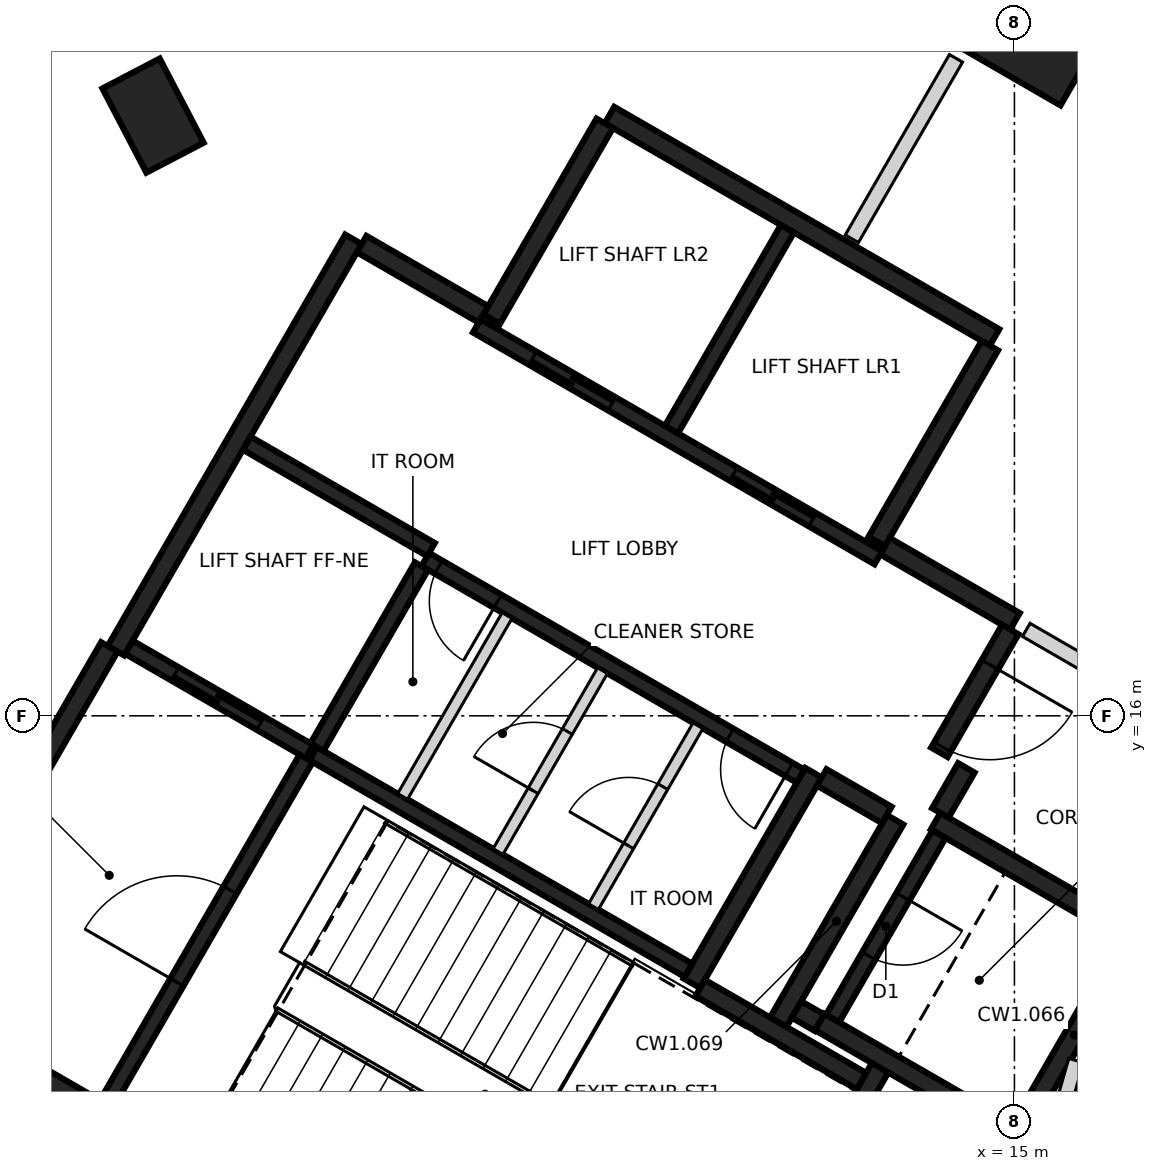
"""IFC4 building model, lengths in metres.
Left out: names, types, materials, properties, quantities, classifications, styles, units other than length and angle.
Written with IfcOpenShell. Run it as: python <this file> out.ifc"""

import sys

from ifc_helpers import new_model, si_unit, direction, frame, frame_2d, origin, origin_2d, place, context, subcontext, project, spatial, rectangle, extrude, element, fill, save


model = new_model("IFC4")
c1 = context("Model", 3, precision=1e-05, world=origin(), true_north=direction((0.0, 1.0)))
c2 = subcontext(c1, "Body", "Model", "MODEL_VIEW")
j1 = project(units=[si_unit("LENGTHUNIT", "METRE"), si_unit("PLANEANGLEUNIT", "RADIAN")], contexts=[c1])
p1 = place(None, origin())
s1 = spatial("IfcSite", under=j1, at=p1, CompositionType="ELEMENT")
p2 = place(p1, origin())
s2 = spatial("IfcBuilding", under=s1, at=p2, CompositionType="ELEMENT")
p3 = place(p2, frame((0.0, 0.0, 154.0)))
s3 = spatial("IfcBuildingStorey", under=s2, at=p3, CompositionType="ELEMENT", Elevation=154.0)
p4 = place(p3, frame((3.667, 23.896, -0.4), z_axis=(0.0, 0.0, 1.0), x_axis=(-0.463006774365, 0.886354740999, 0.0)))
e1 = element("IfcColumn", 1, at=p4, inside=s3, PredefinedType="COLUMN", context=c2, shape_type="SweptSolid", body=[
    extrude(rectangle(XDim=1.25, YDim=0.85, at=origin_2d()), origin(), (0.0, 0.0, 1.0), 3.6),
])
p5 = place(p3, frame((15.207, 26.34, -0.4), z_axis=(0.0, 0.0, 1.0), x_axis=(0.5, 0.866025403784, 0.0)))
e2 = element("IfcColumn", 2, at=p5, inside=s3, PredefinedType="COLUMN", context=c2, shape_type="SweptSolid", body=[
    extrude(rectangle(XDim=3.6, YDim=3.0, at=origin_2d()), origin(), (0.0, 0.0, 1.0), 3.6),
])
p6 = place(p3, frame((10.42, 6.498, 0.0), z_axis=(0.0, 0.0, 1.0), x_axis=(-0.866021906294, 0.500006057782, 0.0)))
e3 = element("IfcWall", 3, at=p6, inside=s3, PredefinedType="SHEAR", context=c2, shape_type="SweptSolid", body=[
    extrude(rectangle(XDim=11.55, YDim=0.25, at=frame_2d((5.775, 0.0))), origin(), (0.0, 0.0, 1.0), 3.2),
])
p7 = place(p6, frame((10.025, 0.0, 0.0)))
e4 = element("IfcOpeningElement", 4, at=p7, cuts=e3, PredefinedType="OPENING", context=c2, shape_type="SweptSolid", body=[
    extrude(rectangle(XDim=1.2, YDim=2.1, at=frame_2d((0.6, 1.05))), frame((0.0, 0.135, 0.0), z_axis=(0.0, -1.0, 0.0), x_axis=(1.0, 0.0, 0.0)), (0.0, 0.0, 1.0), 0.27),
])
p8 = place(p6, frame((8.725, 0.0, 0.0)))
e5 = element("IfcOpeningElement", 5, at=p8, cuts=e3, PredefinedType="OPENING", context=c2, shape_type="SweptSolid", body=[
    extrude(rectangle(XDim=1.2, YDim=2.1, at=frame_2d((0.6, 1.05))), frame((0.0, 0.135, 0.0), z_axis=(0.0, -1.0, 0.0), x_axis=(1.0, 0.0, 0.0)), (0.0, 0.0, 1.0), 0.27),
])
p9 = place(p3, frame((3.179, 16.856, 0.0), z_axis=(0.0, 0.0, 1.0), x_axis=(0.500004234368, 0.866022959057, 0.0)))
e6 = element("IfcWall", 6, at=p9, inside=s3, PredefinedType="SHEAR", context=c2, shape_type="SweptSolid", body=[
    extrude(rectangle(XDim=6.25, YDim=0.25, at=frame_2d((3.125, 0.0))), origin(), (0.0, 0.0, 1.0), 3.2),
])
p10 = place(p3, frame((9.673, 23.903, 0.0), z_axis=(0.0, 0.0, 1.0), x_axis=(0.86603616409, -0.499981362141, 0.0)))
e7 = element("IfcWall", 7, at=p10, inside=s3, PredefinedType="SHEAR", context=c2, shape_type="SweptSolid", body=[
    extrude(rectangle(XDim=5.85, YDim=0.25, at=frame_2d((2.925, 0.0))), origin(), (0.0, 0.0, 1.0), 3.2),
])
p11 = place(p3, frame((0.48, 12.381, 0.0), z_axis=(0.0, 0.0, 1.0), x_axis=(0.49999885962, 0.866026062182, 0.0)))
e8 = element("IfcWall", 8, at=p11, inside=s3, PredefinedType="SHEAR", context=c2, shape_type="SweptSolid", body=[
    extrude(rectangle(XDim=5.225, YDim=0.25, at=frame_2d((2.612, 0.0))), origin(), (0.0, 0.0, 1.0), 3.2),
])
p12 = place(p3, frame((13.238, 11.378, 0.0), z_axis=(0.0, 0.0, 1.0), x_axis=(-0.500008851346, -0.866020293397, 0.0)))
e9 = element("IfcWall", 9, at=p12, inside=s3, PredefinedType="SHEAR", context=c2, shape_type="SweptSolid", body=[
    extrude(rectangle(XDim=5.51, YDim=0.25, at=frame_2d((2.755, 0.0))), origin(), (0.0, 0.0, 1.0), 3.2),
])
p13 = place(p3, frame((12.357, 15.252, 0.0), z_axis=(0.0, 0.0, 1.0), x_axis=(-0.500028443584, -0.866008981251, 0.0)))
e10 = element("IfcWall", 10, at=p13, inside=s3, PredefinedType="SHEAR", context=c2, shape_type="SweptSolid", body=[
    extrude(rectangle(XDim=3.2, YDim=0.25, at=frame_2d((1.6, 0.0))), origin(), (0.0, 0.0, 1.0), 3.2),
])
for number, where, z_axis, x_axis in (
    (11, (8.123, 21.219, 0.0), (0.0, 0.0, 1.0), (0.5, 0.866, 0.0)),
    (12, (14.676, 20.87, 0.0), (0.0, 0.0, 1.0), (-0.5, -0.866, 0.0)),
):
    element("IfcWall", number, at=place(p3, frame(where, z_axis=z_axis, x_axis=x_axis)), inside=s3, PredefinedType="SHEAR", context=c2, shape_type="SweptSolid", body=[
        extrude(rectangle(XDim=2.975, YDim=0.25, at=frame_2d((1.487, 0.0))), origin(), (0.0, 0.0, 1.0), 3.2),
    ])
p14 = place(p3, frame((16.552, 13.119, 0.0), z_axis=(0.0, 0.0, 1.0), x_axis=(-0.499978833458, -0.866037623948, 0.0)))
e13 = element("IfcWall", 13, at=p14, inside=s3, PredefinedType="SHEAR", context=c2, shape_type="SweptSolid", body=[
    extrude(rectangle(XDim=3.05, YDim=0.25, at=frame_2d((1.525, 0.0))), origin(), (0.0, 0.0, 1.0), 3.2),
])
p15 = place(p3, frame((14.918, 10.54, 0.0), z_axis=(0.0, 0.0, 1.0), x_axis=(-0.866063538972, 0.499933942099, 0.0)))
e14 = element("IfcWall", 14, at=p15, inside=s3, PredefinedType="SHEAR", context=c2, shape_type="SweptSolid", body=[
    extrude(rectangle(XDim=2.865, YDim=0.25, at=frame_2d((1.432, 0.0))), origin(), (0.0, 0.0, 1.0), 3.2),
])
p16 = place(p3, frame((13.963, 14.614, 0.0), z_axis=(0.0, 0.0, 1.0), x_axis=(0.866042235819, -0.499970844928, 0.0)))
e15 = element("IfcWall", 15, at=p16, inside=s3, PredefinedType="SHEAR", context=c2, shape_type="SweptSolid", body=[
    extrude(rectangle(XDim=2.865, YDim=0.25, at=frame_2d((1.432, 0.0))), origin(), (0.0, 0.0, 1.0), 3.2),
])
p17 = place(p3, frame((11.888, 11.961, 0.0), z_axis=(0.0, 0.0, 1.0), x_axis=(0.500003324108, 0.866023484601, 0.0)))
e16 = element("IfcWall", 16, at=p17, inside=s3, PredefinedType="SHEAR", context=c2, shape_type="SweptSolid", body=[
    extrude(rectangle(XDim=3.085, YDim=0.25, at=frame_2d((1.542, 0.0))), origin(), (0.0, 0.0, 1.0), 3.2),
])
p18 = place(p3, frame((10.865, 12.418, 0.0), z_axis=(0.0, 0.0, 1.0), x_axis=(0.866026229868, -0.499998569178, 0.0)))
e17 = element("IfcWall", 17, at=p18, inside=s3, PredefinedType="SHEAR", context=c2, shape_type="SweptSolid", body=[
    extrude(rectangle(XDim=2.449, YDim=0.25, at=frame_2d((1.225, 0.0))), origin(), (0.0, 0.0, 1.0), 3.2),
])
p19 = place(p3, frame((13.297, 18.231, 0.0), z_axis=(0.0, 0.0, 1.0), x_axis=(0.866043531843, -0.499968599967, 0.0)))
e18 = element("IfcWall", 18, at=p19, inside=s3, PredefinedType="SHEAR", context=c2, shape_type="SweptSolid", body=[
    extrude(rectangle(XDim=1.975, YDim=0.25, at=frame_2d((0.987, 0.0))), origin(), (0.0, 0.0, 1.0), 3.2),
])
p20 = place(p3, frame((6.413, 22.206, 0.0), z_axis=(0.0, 0.0, 1.0), x_axis=(0.866016279763, -0.500015802937, 0.0)))
e19 = element("IfcWall", 19, at=p20, inside=s3, PredefinedType="SHEAR", context=c2, shape_type="SweptSolid", body=[
    extrude(rectangle(XDim=1.849, YDim=0.25, at=frame_2d((0.925, 0.0))), origin(), (0.0, 0.0, 1.0), 3.2),
])
p21 = place(p3, frame((14.945, 17.135, 0.0), z_axis=(0.0, 0.0, 1.0), x_axis=(-0.499983108224, -0.866035156036, 0.0)))
e20 = element("IfcWall", 20, at=p21, inside=s3, PredefinedType="SHEAR", context=c2, shape_type="SweptSolid", body=[
    extrude(rectangle(XDim=1.865, YDim=0.25, at=frame_2d((0.932, 0.0))), origin(), (0.0, 0.0, 1.0), 3.2),
])
p22 = place(p21, frame((0.535, 0.0, 0.0)))
e21 = element("IfcOpeningElement", 21, at=p22, cuts=e20, PredefinedType="OPENING", context=c2, shape_type="SweptSolid", body=[
    extrude(rectangle(XDim=1.25, YDim=2.1, at=frame_2d((0.625, 1.05))), frame((0.0, 0.135, 0.0), z_axis=(0.0, -1.0, 0.0), x_axis=(1.0, 0.0, 0.0)), (0.0, 0.0, 1.0), 0.27),
])
p23 = place(p3, frame((13.322, 14.695, 0.0), z_axis=(0.0, 0.0, 1.0), x_axis=(-0.866017078145, 0.500014420154, 0.0)))
e22 = element("IfcWall", 22, at=p23, inside=s3, PredefinedType="SHEAR", context=c2, shape_type="SweptSolid", body=[
    extrude(rectangle(XDim=0.989, YDim=0.25, at=frame_2d((0.495, 0.0))), origin(), (0.0, 0.0, 1.0), 3.2),
])
p24 = place(p3, frame((14.368, 15.315, 0.0), z_axis=(0.0, 0.0, 1.0), x_axis=(-0.499897359611, -0.866084655132, 0.0)))
e23 = element("IfcWall", 23, at=p24, inside=s3, PredefinedType="SHEAR", context=c2, shape_type="SweptSolid", body=[
    extrude(rectangle(XDim=0.685, YDim=0.25, at=frame_2d((0.342, 0.0))), origin(), (0.0, 0.0, 1.0), 3.2),
])
p25 = place(p3, frame((12.433, 11.964, 0.0), z_axis=(0.0, 0.0, 1.0), x_axis=(-0.866055875208, 0.499947218231, 0.0)))
e24 = element("IfcWall", 24, at=p25, inside=s3, PredefinedType="SHEAR", context=c2, shape_type="SweptSolid", body=[
    extrude(rectangle(XDim=0.345, YDim=0.25, at=frame_2d((0.172, 0.0))), origin(), (0.0, 0.0, 1.0), 3.2),
])
p26 = place(p3, frame((13.21, 18.08, 0.0), z_axis=(0.0, 0.0, 1.0), x_axis=(-0.866030299012, 0.499991521122, 0.0)))
e25 = element("IfcWall", 25, at=p26, inside=s3, PredefinedType="SHEAR", context=c2, shape_type="SweptSolid", body=[
    extrude(rectangle(XDim=6.1, YDim=0.2, at=frame_2d((3.05, 0.0))), origin(), (0.0, 0.0, 1.0), 3.2),
])
p27 = place(p26, frame((1.0, 0.0, 0.0)))
e26 = element("IfcOpeningElement", 26, at=p27, cuts=e25, PredefinedType="OPENING", context=c2, shape_type="SweptSolid", body=[
    extrude(rectangle(XDim=1.2, YDim=2.1, at=frame_2d((0.6, 1.05))), frame((0.0, 0.11, 0.0), z_axis=(0.0, -1.0, 0.0), x_axis=(1.0, 0.0, 0.0)), (0.0, 0.0, 1.0), 0.22),
])
p28 = place(p26, frame((4.05, 0.0, 0.0)))
e27 = element("IfcOpeningElement", 27, at=p28, cuts=e25, PredefinedType="OPENING", context=c2, shape_type="SweptSolid", body=[
    extrude(rectangle(XDim=1.2, YDim=2.1, at=frame_2d((0.6, 1.05))), frame((0.0, 0.11, 0.0), z_axis=(0.0, -1.0, 0.0), x_axis=(1.0, 0.0, 0.0)), (0.0, 0.0, 1.0), 0.22),
])
p29 = place(p3, frame((5.775, 15.502, 0.0), z_axis=(0.0, 0.0, 1.0), x_axis=(0.866020080793, -0.500009219579, 0.0)))
e28 = element("IfcWall", 28, at=p29, inside=s3, PredefinedType="SHEAR", context=c2, shape_type="SweptSolid", body=[
    extrude(rectangle(XDim=5.699, YDim=0.2, at=frame_2d((2.85, 0.0))), origin(), (0.0, 0.0, 1.0), 3.2),
])
p30 = place(p3, frame((12.185, 15.207, 0.0), z_axis=(0.0, 0.0, 1.0), x_axis=(-0.866020080793, 0.500009219579, 0.0)))
e29 = element("IfcWall", 29, at=p30, inside=s3, PredefinedType="SHEAR", context=c2, shape_type="SweptSolid", body=[
    extrude(rectangle(XDim=5.699, YDim=0.2, at=frame_2d((2.85, 0.0))), origin(), (0.0, 0.0, 1.0), 3.2),
])
p31 = place(p30, frame((0.174, 0.0, 0.0)))
e30 = element("IfcOpeningElement", 30, at=p31, cuts=e29, PredefinedType="OPENING", context=c2, shape_type="SweptSolid", body=[
    extrude(rectangle(XDim=0.9, YDim=2.1, at=frame_2d((0.45, 1.05))), frame((0.0, 0.11, 0.0), z_axis=(0.0, -1.0, 0.0), x_axis=(1.0, 0.0, 0.0)), (0.0, 0.0, 1.0), 0.22),
])
p32 = place(p30, frame((4.599, 0.0, 0.0)))
e31 = element("IfcOpeningElement", 31, at=p32, cuts=e29, PredefinedType="OPENING", context=c2, shape_type="SweptSolid", body=[
    extrude(rectangle(XDim=0.9, YDim=2.1, at=frame_2d((0.45, 1.05))), frame((0.0, 0.11, 0.0), z_axis=(0.0, -1.0, 0.0), x_axis=(1.0, 0.0, 0.0)), (0.0, 0.0, 1.0), 0.22),
])
p33 = place(p3, frame((3.057, 10.895, 0.0), z_axis=(0.0, 0.0, 1.0), x_axis=(0.499989418164, 0.866031513124, 0.0)))
e32 = element("IfcWall", 32, at=p33, inside=s3, PredefinedType="SHEAR", context=c2, shape_type="SweptSolid", body=[
    extrude(rectangle(XDim=5.251, YDim=0.2, at=frame_2d((2.625, 0.0))), origin(), (0.0, 0.0, 1.0), 3.2),
])
p34 = place(p33, frame((1.849, 0.0, 0.0)))
e33 = element("IfcOpeningElement", 33, at=p34, cuts=e32, PredefinedType="OPENING", context=c2, shape_type="SweptSolid", body=[
    extrude(rectangle(XDim=1.4, YDim=2.1, at=frame_2d((0.7, 1.05))), frame((0.0, 0.11, 0.0), z_axis=(0.0, -1.0, 0.0), x_axis=(1.0, 0.0, 0.0)), (0.0, 0.0, 1.0), 0.22),
])
p35 = place(p3, frame((10.489, 19.767, 0.0), z_axis=(0.0, 0.0, 1.0), x_axis=(0.499946628782, 0.866056215479, 0.0)))
e34 = element("IfcWall", 34, at=p35, inside=s3, PredefinedType="SHEAR", context=c2, shape_type="SweptSolid", body=[
    extrude(rectangle(XDim=3.048, YDim=0.2, at=frame_2d((1.524, 0.0))), origin(), (0.0, 0.0, 1.0), 3.2),
])
p36 = place(p3, frame((14.008, 14.442, 0.0), z_axis=(0.0, 0.0, 1.0), x_axis=(-0.499986818241, -0.866033014143, 0.0)))
e35 = element("IfcWall", 35, at=p36, inside=s3, PredefinedType="SHEAR", context=c2, shape_type="SweptSolid", body=[
    extrude(rectangle(XDim=2.798, YDim=0.2, at=frame_2d((1.399, 0.0))), origin(), (0.0, 0.0, 1.0), 3.2),
])
p37 = place(p36, frame((0.949, 0.0, 0.0)))
e36 = element("IfcOpeningElement", 36, at=p37, cuts=e35, PredefinedType="OPENING", context=c2, shape_type="SweptSolid", body=[
    extrude(rectangle(XDim=0.9, YDim=2.1, at=frame_2d((0.45, 1.05))), frame((0.0, 0.11, 0.0), z_axis=(0.0, -1.0, 0.0), x_axis=(1.0, 0.0, 0.0)), (0.0, 0.0, 1.0), 0.22),
])
p38 = place(p3, frame((7.199, 17.97, 0.0), z_axis=(0.0, 0.0, 1.0), x_axis=(-0.499968400327, -0.866043647095, 0.0)))
e37 = element("IfcWall", 37, at=p38, inside=s3, PredefinedType="SHEAR", context=c2, shape_type="SweptSolid", body=[
    extrude(rectangle(XDim=2.75, YDim=0.2, at=frame_2d((1.375, 0.0))), origin(), (0.0, 0.0, 1.0), 3.2),
])
p39 = place(p3, frame((5.725, 15.531, 0.0), z_axis=(0.0, 0.0, 1.0), x_axis=(-0.866037306777, 0.499979382845, 0.0)))
e38 = element("IfcWall", 38, at=p39, inside=s3, PredefinedType="SHEAR", context=c2, shape_type="SweptSolid", body=[
    extrude(rectangle(XDim=2.742, YDim=0.2, at=frame_2d((1.371, 0.0))), origin(), (0.0, 0.0, 1.0), 3.2),
])
p40 = place(p39, frame((0.743, 0.0, 0.0)))
e39 = element("IfcOpeningElement", 39, at=p40, cuts=e38, PredefinedType="OPENING", context=c2, shape_type="SweptSolid", body=[
    extrude(rectangle(XDim=1.3, YDim=2.1, at=frame_2d((0.65, 1.05))), frame((0.0, 0.11, 0.0), z_axis=(0.0, -1.0, 0.0), x_axis=(1.0, 0.0, 0.0)), (0.0, 0.0, 1.0), 0.22),
])
p41 = place(p3, frame((4.901, 19.586, 0.0), z_axis=(0.0, 0.0, 1.0), x_axis=(0.866022890907, -0.500004352405, 0.0)))
e40 = element("IfcWall", 40, at=p41, inside=s3, PredefinedType="SHEAR", context=c2, shape_type="SweptSolid", body=[
    extrude(rectangle(XDim=2.799, YDim=0.2, at=frame_2d((1.399, 0.0))), origin(), (0.0, 0.0, 1.0), 3.2),
])
p42 = place(p3, frame((9.462, 13.489, 0.0), z_axis=(0.0, 0.0, 1.0), x_axis=(0.50002746344, 0.86600954718, 0.0)))
e41 = element("IfcWall", 41, at=p42, inside=s3, PredefinedType="PARTITIONING", context=c2, shape_type="SweptSolid", body=[
    extrude(rectangle(XDim=2.748, YDim=0.15, at=frame_2d((1.374, 0.0))), origin(), (0.0, 0.0, 1.0), 3.2),
])
p43 = place(p42, frame((0.924, 0.0, 0.0)))
e42 = element("IfcOpeningElement", 42, at=p43, cuts=e41, PredefinedType="OPENING", context=c2, shape_type="SweptSolid", body=[
    extrude(rectangle(XDim=0.9, YDim=2.1, at=frame_2d((0.45, 1.05))), frame((0.0, 0.085, 0.0), z_axis=(0.0, -1.0, 0.0), x_axis=(1.0, 0.0, 0.0)), (0.0, 0.0, 1.0), 0.17),
])
p44 = place(p3, frame((8.207, 14.214, 0.0), z_axis=(0.0, 0.0, 1.0), x_axis=(0.499922376475, 0.866070215109, 0.0)))
e43 = element("IfcWall", 43, at=p44, inside=s3, PredefinedType="PARTITIONING", context=c2, shape_type="SweptSolid", body=[
    extrude(rectangle(XDim=2.749, YDim=0.15, at=frame_2d((1.374, 0.0))), origin(), (0.0, 0.0, 1.0), 3.2),
])
p45 = place(p44, frame((0.924, 0.0, 0.0)))
e44 = element("IfcOpeningElement", 44, at=p45, cuts=e43, PredefinedType="OPENING", context=c2, shape_type="SweptSolid", body=[
    extrude(rectangle(XDim=0.9, YDim=2.1, at=frame_2d((0.45, 1.05))), frame((0.0, 0.085, 0.0), z_axis=(0.0, -1.0, 0.0), x_axis=(1.0, 0.0, 0.0)), (0.0, 0.0, 1.0), 0.17),
])
p46 = place(p3, frame((6.951, 14.939, 0.0), z_axis=(0.0, 0.0, 1.0), x_axis=(0.50002746344, 0.86600954718, 0.0)))
e45 = element("IfcWall", 45, at=p46, inside=s3, PredefinedType="PARTITIONING", context=c2, shape_type="SweptSolid", body=[
    extrude(rectangle(XDim=2.748, YDim=0.15, at=frame_2d((1.374, 0.0))), origin(), (0.0, 0.0, 1.0), 3.2),
])
p47 = place(p3, frame((15.156, 17.13, 0.0), z_axis=(0.0, 0.0, 1.0), x_axis=(0.865755062894, -0.500467952093, 0.0)))
e46 = element("IfcWall", 46, at=p47, inside=s3, PredefinedType="PARTITIONING", context=c2, shape_type="SweptSolid", body=[
    extrude(rectangle(XDim=1.389, YDim=0.2, at=frame_2d((0.694, 0.0))), origin(), (0.0, 0.0, 1.0), 3.2),
])
p48 = place(p3, frame((15.52, 10.445, 0.0), z_axis=(0.0, 0.0, 1.0), x_axis=(0.274143458758, 0.961688808306, 0.0)))
e47 = element("IfcWall", 47, at=p48, inside=s3, PredefinedType="PARTITIONING", context=c2, shape_type="SweptSolid", body=[
    extrude(rectangle(XDim=1.061, YDim=0.2, at=frame_2d((0.53, 0.0))), origin(), (0.0, 0.0, 1.0), 3.2),
])
p49 = place(p3, frame((12.861, 22.276, 0.0), z_axis=(0.0, 0.0, 1.0), x_axis=(0.49982784299, 0.866124775868, 0.0)))
e48 = element("IfcWall", 48, at=p49, inside=s3, PredefinedType="PARTITIONING", context=c2, shape_type="SweptSolid", body=[
    extrude(rectangle(XDim=2.741, YDim=0.2, at=frame_2d((1.37, 0.0))), origin(), (0.0, 0.0, 1.0), 3.2),
])
p50 = place(p40, origin())
e49 = element("IfcDoor", 49, at=p50, inside=s3, OperationType="SLIDING_TO_RIGHT", PredefinedType="DOOR", context=c2, shape_type="SweptSolid", body=[
    extrude(rectangle(XDim=1.3, YDim=2.1, at=frame_2d((0.65, 1.05))), frame((0.0, 0.025, 0.0), z_axis=(0.0, -1.0, 0.0), x_axis=(1.0, 0.0, 0.0)), (0.0, 0.0, 1.0), 0.05),
])
fill(e39, e49)
p51 = place(p27, origin())
e50 = element("IfcDoor", 50, at=p51, inside=s3, OperationType="DOUBLE_DOOR_SLIDING", PredefinedType="DOOR", context=c2, shape_type="SweptSolid", body=[
    extrude(rectangle(XDim=1.2, YDim=2.1, at=frame_2d((0.6, 1.05))), frame((0.0, 0.025, 0.0), z_axis=(0.0, -1.0, 0.0), x_axis=(1.0, 0.0, 0.0)), (0.0, 0.0, 1.0), 0.05),
])
fill(e26, e50)
p52 = place(p28, origin())
e51 = element("IfcDoor", 51, at=p52, inside=s3, OperationType="DOUBLE_DOOR_SLIDING", PredefinedType="DOOR", context=c2, shape_type="SweptSolid", body=[
    extrude(rectangle(XDim=1.2, YDim=2.1, at=frame_2d((0.6, 1.05))), frame((0.0, 0.025, 0.0), z_axis=(0.0, -1.0, 0.0), x_axis=(1.0, 0.0, 0.0)), (0.0, 0.0, 1.0), 0.05),
])
fill(e27, e51)
p53 = place(p22, origin())
e52 = element("IfcDoor", 52, at=p53, inside=s3, OperationType="SINGLE_SWING_LEFT", PredefinedType="DOOR", context=c2, shape_type="SweptSolid", body=[
    extrude(rectangle(XDim=1.25, YDim=2.1, at=frame_2d((0.625, 1.05))), frame((0.0, 0.025, 0.0), z_axis=(0.0, -1.0, 0.0), x_axis=(1.0, 0.0, 0.0)), (0.0, 0.0, 1.0), 0.05),
])
fill(e21, e52)
p54 = place(p8, origin())
e53 = element("IfcDoor", 53, at=p54, inside=s3, OperationType="SINGLE_SWING_RIGHT", PredefinedType="DOOR", context=c2, shape_type="SweptSolid", body=[
    extrude(rectangle(XDim=1.2, YDim=2.1, at=frame_2d((0.6, 1.05))), frame((0.0, 0.025, 0.0), z_axis=(0.0, -1.0, 0.0), x_axis=(1.0, 0.0, 0.0)), (0.0, 0.0, 1.0), 0.05),
])
fill(e5, e53)
p55 = place(p34, origin())
e54 = element("IfcDoor", 54, at=p55, inside=s3, OperationType="SINGLE_SWING_RIGHT", PredefinedType="DOOR", context=c2, shape_type="SweptSolid", body=[
    extrude(rectangle(XDim=1.4, YDim=2.1, at=frame_2d((0.7, 1.05))), frame((0.0, 0.025, 0.0), z_axis=(0.0, -1.0, 0.0), x_axis=(1.0, 0.0, 0.0)), (0.0, 0.0, 1.0), 0.05),
])
fill(e33, e54)
p56 = place(p31, origin())
e55 = element("IfcDoor", 55, at=p56, inside=s3, OperationType="SINGLE_SWING_LEFT", PredefinedType="DOOR", context=c2, shape_type="SweptSolid", body=[
    extrude(rectangle(XDim=0.9, YDim=2.1, at=frame_2d((0.45, 1.05))), frame((0.0, 0.025, 0.0), z_axis=(0.0, -1.0, 0.0), x_axis=(1.0, 0.0, 0.0)), (0.0, 0.0, 1.0), 0.05),
])
fill(e30, e55)
p57 = place(p43, origin())
e56 = element("IfcDoor", 56, at=p57, inside=s3, OperationType="SINGLE_SWING_RIGHT", PredefinedType="DOOR", context=c2, shape_type="SweptSolid", body=[
    extrude(rectangle(XDim=0.9, YDim=2.1, at=frame_2d((0.45, 1.05))), frame((0.0, 0.025, 0.0), z_axis=(0.0, -1.0, 0.0), x_axis=(1.0, 0.0, 0.0)), (0.0, 0.0, 1.0), 0.05),
])
fill(e42, e56)
p58 = place(p45, origin())
e57 = element("IfcDoor", 57, at=p58, inside=s3, OperationType="SINGLE_SWING_LEFT", PredefinedType="DOOR", context=c2, shape_type="SweptSolid", body=[
    extrude(rectangle(XDim=0.9, YDim=2.1, at=frame_2d((0.45, 1.05))), frame((0.0, 0.025, 0.0), z_axis=(0.0, -1.0, 0.0), x_axis=(1.0, 0.0, 0.0)), (0.0, 0.0, 1.0), 0.05),
])
fill(e44, e57)
p59 = place(p32, origin())
e58 = element("IfcDoor", 58, at=p59, inside=s3, OperationType="SINGLE_SWING_RIGHT", PredefinedType="DOOR", context=c2, shape_type="SweptSolid", body=[
    extrude(rectangle(XDim=0.9, YDim=2.1, at=frame_2d((0.45, 1.05))), frame((0.0, 0.025, 0.0), z_axis=(0.0, -1.0, 0.0), x_axis=(1.0, 0.0, 0.0)), (0.0, 0.0, 1.0), 0.05),
])
fill(e31, e58)
p60 = place(p37, origin())
e59 = element("IfcDoor", 59, at=p60, inside=s3, OperationType="SINGLE_SWING_LEFT", PredefinedType="DOOR", context=c2, shape_type="SweptSolid", body=[
    extrude(rectangle(XDim=0.9, YDim=2.1, at=frame_2d((0.45, 1.05))), frame((0.0, 0.025, 0.0), z_axis=(0.0, -1.0, 0.0), x_axis=(1.0, 0.0, 0.0)), (0.0, 0.0, 1.0), 0.05),
])
fill(e36, e59)
save(model, sys.argv[1])
